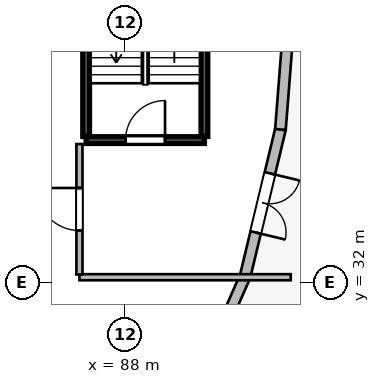
"""IFC4 building model, lengths in metres.
Left out: names, types, materials, properties, quantities, classifications, styles, units other than length and angle.
Written with IfcOpenShell. Run it as: python <this file> out.ifc"""

import sys

from ifc_helpers import new_model, si_unit, direction, frame, frame_2d, origin, origin_2d, place, context, subcontext, project, spatial, rectangle, extrude, source, transform, mapped, element, fill, save


model = new_model("IFC4")
c1 = context("Model", 3, precision=1e-05, world=origin(), true_north=direction((0.0, 1.0)))
c2 = subcontext(c1, "Body", "Model", "MODEL_VIEW")
j1 = project(units=[si_unit("LENGTHUNIT", "METRE"), si_unit("PLANEANGLEUNIT", "RADIAN")], contexts=[c1])
p1 = place(None, origin())
s1 = spatial("IfcSite", under=j1, at=p1, CompositionType="ELEMENT")
p2 = place(p1, origin())
s2 = spatial("IfcBuilding", under=s1, at=p2, CompositionType="ELEMENT")
p3 = place(p2, origin())
s3 = spatial("IfcBuildingStorey", under=s2, at=p3, CompositionType="ELEMENT", Elevation=0.0)
m1 = source(origin(), c2, "Body", "SweptSolid", [
    extrude(rectangle(XDim=2.0, YDim=2.0, at=origin_2d()), origin(), (0.0, 0.0, 1.0), 6.0),
])
p4 = place(p3, frame((85.14, 30.137, 0.0), z_axis=(0.0, 0.0, 1.0), x_axis=(0.923879532511, -0.382683432365, 0.0)))
e1 = element("IfcColumn", 1, at=p4, inside=s3, PredefinedType="COLUMN", context=c2, shape_type="MappedRepresentation", body=[
    mapped(m1, transform((0.0, 0.0, 0.0), scale=1.0)),
])
m2 = source(origin(), c2, "Body", "SweptSolid", [
    extrude(rectangle(XDim=4.756, YDim=0.35, at=frame_2d((2.378, 0.0))), origin(), (0.0, 0.0, 1.0), 5.7),
])
p5 = place(p3, frame((91.95, 32.208, 0.0), z_axis=(0.0, 0.0, 1.0), x_axis=(-0.402248274654, -0.915530625123, 0.0)))
e2 = element("IfcWall", 2, at=p5, inside=s3, PredefinedType="SOLIDWALL", context=c2, shape_type="MappedRepresentation", body=[
    mapped(m2, transform((0.0, 0.0, 0.0), scale=1.0)),
])
m3 = source(origin(), c2, "Body", "SweptSolid", [
    extrude(rectangle(XDim=4.969, YDim=0.35, at=frame_2d((2.484, 0.0))), origin(), (0.0, 0.0, 1.0), 5.7),
])
p6 = place(p3, frame((93.111, 37.04, 0.0), z_axis=(0.0, 0.0, 1.0), x_axis=(-0.233623809029, -0.972327062184, 0.0)))
e3 = element("IfcWall", 3, at=p6, inside=s3, PredefinedType="SOLIDWALL", context=c2, shape_type="MappedRepresentation", body=[
    mapped(m3, transform((0.0, 0.0, 0.0), scale=1.0)),
])
p7 = place(p6, frame((1.485, 0.0, 0.0)))
e4 = element("IfcOpeningElement", 4, at=p7, cuts=e3, PredefinedType="OPENING", context=c2, shape_type="SweptSolid", body=[
    extrude(rectangle(XDim=2.0, YDim=2.4, at=frame_2d((1.0, 1.2))), frame((0.0, 0.185, 0.0), z_axis=(0.0, -1.0, 0.0), x_axis=(1.0, 0.0, 0.0)), (0.0, 0.0, 1.0), 0.37),
])
m4 = source(origin(), c2, "Body", "SweptSolid", [
    extrude(rectangle(XDim=4.975, YDim=0.35, at=frame_2d((2.488, 0.0))), origin(), (0.0, 0.0, 1.0), 5.7),
])
p8 = place(p3, frame((93.5, 42.0, 0.0), z_axis=(0.0, 0.0, 1.0), x_axis=(-0.07826870534, -0.996932299489, 0.0)))
e5 = element("IfcWall", 5, at=p8, inside=s3, PredefinedType="SOLIDWALL", context=c2, shape_type="MappedRepresentation", body=[
    mapped(m4, transform((0.0, 0.0, 0.0), scale=1.0)),
])
m5 = source(origin(), c2, "Body", "SweptSolid", [
    extrude(rectangle(XDim=3.89, YDim=0.22, at=frame_2d((1.945, 0.0))), origin(), (0.0, 0.0, 1.0), 6.0),
])
p9 = place(p3, frame((86.72, 36.69, 0.0), z_axis=(0.0, 0.0, 1.0), x_axis=(1.0, 0.0, 0.0)))
e6 = element("IfcWall", 6, at=p9, inside=s3, PredefinedType="SOLIDWALL", context=c2, shape_type="MappedRepresentation", body=[
    mapped(m5, transform((0.0, 0.0, 0.0), scale=1.0)),
])
p10 = place(p9, frame((1.295, 0.0, 0.0)))
e7 = element("IfcOpeningElement", 7, at=p10, cuts=e6, PredefinedType="OPENING", context=c2, shape_type="SweptSolid", body=[
    extrude(rectangle(XDim=1.3, YDim=2.15, at=frame_2d((0.65, 1.075))), frame((0.0, 0.12, 0.0), z_axis=(0.0, -1.0, 0.0), x_axis=(1.0, 0.0, 0.0)), (0.0, 0.0, 1.0), 0.24),
])
m6 = source(origin(), c2, "Body", "SweptSolid", [
    extrude(rectangle(XDim=10.38, YDim=0.22, at=frame_2d((5.19, 0.0))), origin(), (0.0, 0.0, 1.0), 6.0),
])
for number, where, z_axis, x_axis in (
    (8, (86.72, 36.81, 0.0), (0.0, 0.0, 1.0), (0.0, 1.0, 0.0)),
    (9, (90.61, 36.81, 0.0), (0.0, 0.0, 1.0), (0.0, 1.0, 0.0)),
):
    element("IfcWall", number, at=place(p3, frame(where, z_axis=z_axis, x_axis=x_axis)), inside=s3, PredefinedType="SOLIDWALL", context=c2, shape_type="MappedRepresentation", body=[
        mapped(m6, transform((0.0, 0.0, 0.0), scale=1.0)),
    ])
m7 = source(origin(), c2, "Body", "SweptSolid", [
    extrude(rectangle(XDim=6.95, YDim=0.2, at=frame_2d((3.475, 0.0))), origin(), (0.0, 0.0, 1.0), 5.7),
])
p11 = place(p3, frame((86.5, 32.18, 0.0), z_axis=(0.0, 0.0, 1.0), x_axis=(1.0, 0.0, 0.0)))
e10 = element("IfcWall", 10, at=p11, inside=s3, PredefinedType="SOLIDWALL", context=c2, shape_type="MappedRepresentation", body=[
    mapped(m7, transform((0.0, 0.0, 0.0), scale=1.0)),
])
m8 = source(origin(), c2, "Body", "SweptSolid", [
    extrude(rectangle(XDim=4.29, YDim=0.2, at=frame_2d((2.145, 0.0))), origin(), (0.0, 0.0, 1.0), 5.7),
])
p12 = place(p3, frame((86.5, 32.27, 0.0), z_axis=(0.0, 0.0, 1.0), x_axis=(0.0, 1.0, 0.0)))
e11 = element("IfcWall", 11, at=p12, inside=s3, PredefinedType="SOLIDWALL", context=c2, shape_type="MappedRepresentation", body=[
    mapped(m8, transform((0.0, 0.0, 0.0), scale=1.0)),
])
p13 = place(p12, frame((1.445, 0.0, 0.0)))
e12 = element("IfcOpeningElement", 12, at=p13, cuts=e11, PredefinedType="OPENING", context=c2, shape_type="SweptSolid", body=[
    extrude(rectangle(XDim=1.4, YDim=2.15, at=frame_2d((0.7, 1.075))), frame((0.0, 0.11, 0.0), z_axis=(0.0, -1.0, 0.0), x_axis=(1.0, 0.0, 0.0)), (0.0, 0.0, 1.0), 0.22),
])
m9 = source(origin(), c2, "Body", "SweptSolid", [
    extrude(rectangle(XDim=2.0, YDim=2.4, at=frame_2d((1.0, 1.2))), frame((0.0, 0.025, 0.0), z_axis=(0.0, -1.0, 0.0), x_axis=(1.0, 0.0, 0.0)), (0.0, 0.0, 1.0), 0.05),
])
p14 = place(p7, origin())
e13 = element("IfcDoor", 13, at=p14, inside=s3, OperationType="DOUBLE_DOOR_SINGLE_SWING", PredefinedType="DOOR", context=c2, shape_type="MappedRepresentation", body=[
    mapped(m9, transform((0.0, 0.0, 0.0), scale=1.0)),
])
fill(e4, e13)
m10 = source(origin(), c2, "Body", "SweptSolid", [
    extrude(rectangle(XDim=1.3, YDim=2.15, at=frame_2d((0.65, 1.075))), frame((0.0, 0.025, 0.0), z_axis=(0.0, -1.0, 0.0), x_axis=(1.0, 0.0, 0.0)), (0.0, 0.0, 1.0), 0.05),
])
p15 = place(p10, origin())
e14 = element("IfcDoor", 14, at=p15, inside=s3, OperationType="SINGLE_SWING_RIGHT", PredefinedType="DOOR", context=c2, shape_type="MappedRepresentation", body=[
    mapped(m10, transform((0.0, 0.0, 0.0), scale=1.0)),
])
fill(e7, e14)
m11 = source(origin(), c2, "Body", "SweptSolid", [
    extrude(rectangle(XDim=1.4, YDim=2.15, at=frame_2d((0.7, 1.075))), frame((0.0, 0.025, 0.0), z_axis=(0.0, -1.0, 0.0), x_axis=(1.0, 0.0, 0.0)), (0.0, 0.0, 1.0), 0.05),
])
p16 = place(p13, origin())
e15 = element("IfcDoor", 15, at=p16, inside=s3, OperationType="SINGLE_SWING_RIGHT", PredefinedType="DOOR", context=c2, shape_type="MappedRepresentation", body=[
    mapped(m11, transform((0.0, 0.0, 0.0), scale=1.0)),
])
fill(e12, e15)
save(model, sys.argv[1])
